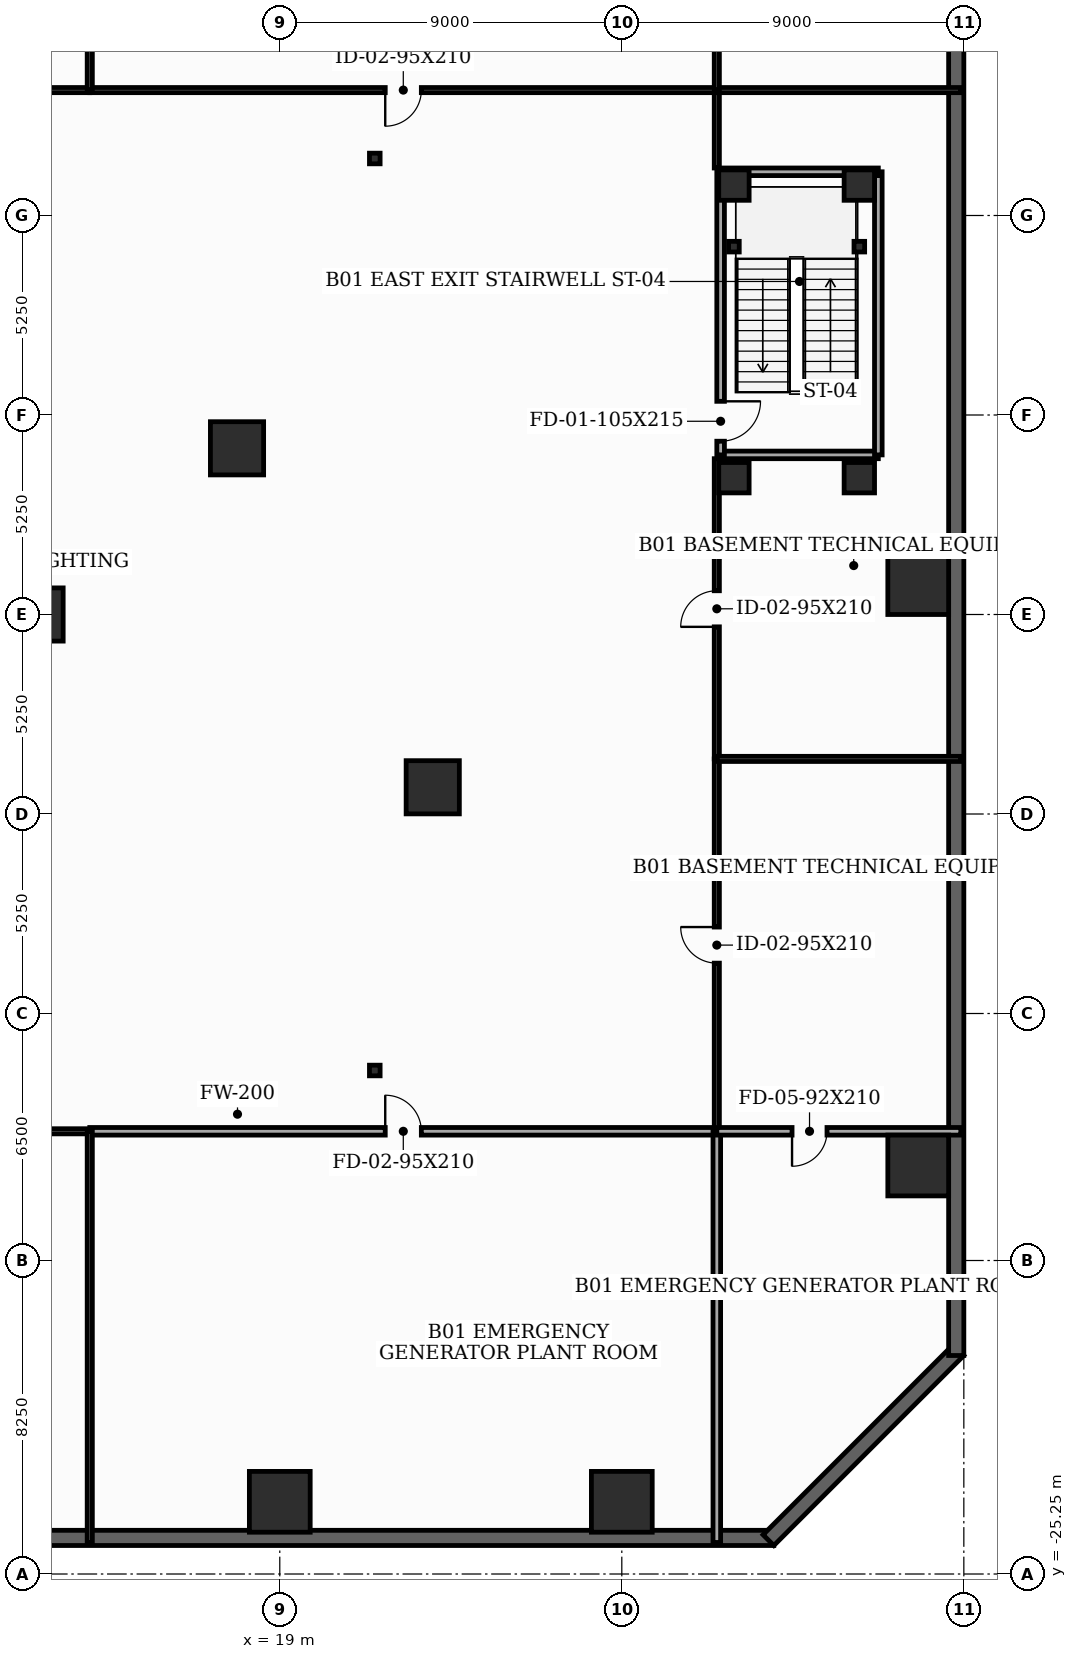
"""IFC4 building model, lengths in metres.
Left out: names, types, materials, properties, quantities, classifications, styles, units other than length and angle.
Written with IfcOpenShell. Run it as: python <this file> out.ifc"""

import sys

from ifc_helpers import new_model, si_unit, direction, frame, frame_2d, origin, origin_2d, place, context, subcontext, project, spatial, rectangle, i_section, extrude, element, fill, save


model = new_model("IFC4")
c1 = context("Model", 3, precision=1e-05, world=origin(), true_north=direction((0.0, 1.0)))
c2 = subcontext(c1, "Body", "Model", "MODEL_VIEW")
j1 = project(units=[si_unit("LENGTHUNIT", "METRE"), si_unit("PLANEANGLEUNIT", "RADIAN")], contexts=[c1])
p1 = place(None, origin())
s1 = spatial("IfcSite", under=j1, at=p1, CompositionType="ELEMENT")
p2 = place(p1, origin())
s2 = spatial("IfcBuilding", under=s1, at=p2, CompositionType="ELEMENT")
p3 = place(p2, frame((0.0, 0.0, -4.8)))
s3 = spatial("IfcBuildingStorey", under=s2, at=p3, CompositionType="ELEMENT", Elevation=-4.8)
p4 = place(p3, frame((12.6, 0.0, 0.0), z_axis=(0.0, 0.0, 1.0), x_axis=(1.0, 0.0, 0.0)))
e1 = element("IfcColumn", 1, at=p4, inside=s3, PredefinedType="COLUMN", context=c2, shape_type="SweptSolid", body=[
    extrude(rectangle(XDim=1.4, YDim=1.4, at=origin_2d()), origin(), (0.0, 0.0, 1.0), 4.8),
])
for number, where, z_axis, x_axis in (
    (2, (19.0, -23.35, 0.0), (0.0, 0.0, 1.0), (1.0, 0.0, 0.0)),
    (3, (28.0, -23.35, 0.0), (0.0, 0.0, 1.0), (1.0, 0.0, 0.0)),
    (4, (35.8, -14.5, 0.0), (0.0, 0.0, 1.0), (1.0, 0.0, 0.0)),
    (5, (35.8, 0.8, 0.0), (0.0, 0.0, 1.0), (1.0, 0.0, 0.0)),
):
    element("IfcColumn", number, at=place(p3, frame(where, z_axis=z_axis, x_axis=x_axis)), inside=s3, PredefinedType="COLUMN", context=c2, shape_type="SweptSolid", body=[
        extrude(rectangle(XDim=1.6, YDim=1.6, at=origin_2d()), origin(), (0.0, 0.0, 1.0), 4.8),
    ])
for number, where, z_axis, x_axis in (
    (6, (23.025, -4.547, 0.0), (0.0, 0.0, 1.0), (1.0, 0.0, 0.0)),
    (7, (17.875, 4.373, 0.0), (0.0, 0.0, 1.0), (1.0, 0.0, 0.0)),
):
    element("IfcColumn", number, at=place(p3, frame(where, z_axis=z_axis, x_axis=x_axis)), inside=s3, PredefinedType="COLUMN", context=c2, shape_type="SweptSolid", body=[
        extrude(rectangle(XDim=1.4, YDim=1.4, at=origin_2d()), origin(), (0.0, 0.0, 1.0), 4.8),
    ])
for number, where, z_axis, x_axis in (
    (8, (21.5, -12.0, 0.0), (0.0, 0.0, 1.0), (1.0, 0.0, 0.0)),
    (9, (21.5, 12.0, 0.0), (0.0, 0.0, 1.0), (1.0, 0.0, 0.0)),
):
    element("IfcColumn", number, at=place(p3, frame(where, z_axis=z_axis, x_axis=x_axis)), inside=s3, PredefinedType="PILASTER", context=c2, shape_type="SweptSolid", body=[
        extrude(i_section(OverallWidth=0.28, OverallDepth=0.28, WebThickness=0.01, FlangeThickness=0.018, at=origin_2d()), origin(), (0.0, 0.0, 1.0), 4.8),
    ])
for number, where, z_axis, x_axis in (
    (10, (30.95, 3.6, 0.0), (0.0, 0.0, 1.0), (1.0, 0.0, 0.0)),
    (11, (34.25, 3.6, 0.0), (0.0, 0.0, 1.0), (1.0, 0.0, 0.0)),
    (12, (34.25, 11.3, 0.0), (0.0, 0.0, 1.0), (1.0, 0.0, 0.0)),
    (13, (30.95, 11.3, 0.0), (0.0, 0.0, 1.0), (1.0, 0.0, 0.0)),
):
    element("IfcColumn", number, at=place(p3, frame(where, z_axis=z_axis, x_axis=x_axis)), inside=s3, PredefinedType="COLUMN", context=c2, shape_type="SweptSolid", body=[
        extrude(rectangle(XDim=0.8, YDim=0.8, at=origin_2d()), origin(), (0.0, 0.0, 1.0), 4.8),
    ])
for number, where, z_axis, x_axis in (
    (14, (30.95, 9.68, 0.0), (0.0, 0.0, 1.0), (1.0, 0.0, 0.0)),
    (15, (34.25, 9.68, 0.0), (0.0, 0.0, 1.0), (1.0, 0.0, 0.0)),
):
    element("IfcColumn", number, at=place(p3, frame(where, z_axis=z_axis, x_axis=x_axis)), inside=s3, PredefinedType="PILASTER", context=c2, shape_type="SweptSolid", body=[
        extrude(i_section(OverallWidth=0.28, OverallDepth=0.28, WebThickness=0.01, FlangeThickness=0.018, at=origin_2d()), origin(), (0.0, 0.0, 1.0), 4.8),
    ])
p5 = place(p3, frame((-32.0, -24.3, 0.0), z_axis=(0.0, 0.0, 1.0), x_axis=(1.0, 0.0, 0.0)))
e16 = element("IfcWall", 16, at=p5, inside=s3, PredefinedType="USERDEFINED", context=c2, shape_type="SweptSolid", body=[
    extrude(rectangle(XDim=64.0, YDim=0.4, at=frame_2d((32.0, 0.0))), origin(), (0.0, 0.0, 1.0), 4.55),
])
p6 = place(p3, frame((31.859, -24.359, 0.0), z_axis=(0.0, 0.0, 1.0), x_axis=(0.707106781187, 0.707106781187, 0.0)))
e17 = element("IfcWall", 17, at=p6, inside=s3, PredefinedType="USERDEFINED", context=c2, shape_type="SweptSolid", body=[
    extrude(rectangle(XDim=7.071, YDim=0.4, at=frame_2d((3.536, 0.0))), origin(), (0.0, 0.0, 1.0), 4.55),
])
p7 = place(p3, frame((36.8, -19.5, 0.0), z_axis=(0.0, 0.0, 1.0), x_axis=(0.0, 1.0, 0.0)))
e18 = element("IfcWall", 18, at=p7, inside=s3, PredefinedType="USERDEFINED", context=c2, shape_type="SweptSolid", body=[
    extrude(rectangle(XDim=48.0, YDim=0.4, at=frame_2d((24.0, 0.0))), origin(), (0.0, 0.0, 1.0), 4.55),
])
p8 = place(p3, frame((30.6, 4.2, 0.0), z_axis=(0.0, 0.0, 1.0), x_axis=(1.0, 0.0, 0.0)))
e19 = element("IfcWall", 19, at=p8, inside=s3, PredefinedType="SOLIDWALL", context=c2, shape_type="SweptSolid", body=[
    extrude(rectangle(XDim=4.15, YDim=0.2, at=frame_2d((2.075, 0.0))), origin(), (0.0, 0.0, 1.0), 3.935),
])
p9 = place(p3, frame((34.75, 4.2, 0.0), z_axis=(0.0, 0.0, 1.0), x_axis=(0.0, 1.0, 0.0)))
e20 = element("IfcWall", 20, at=p9, inside=s3, PredefinedType="SOLIDWALL", context=c2, shape_type="SweptSolid", body=[
    extrude(rectangle(XDim=7.45, YDim=0.2, at=frame_2d((3.725, 0.0))), origin(), (0.0, 0.0, 1.0), 4.55),
])
p10 = place(p3, frame((34.75, 11.65, 0.0), z_axis=(0.0, 0.0, 1.0), x_axis=(-1.0, 0.0, 0.0)))
e21 = element("IfcWall", 21, at=p10, inside=s3, PredefinedType="SOLIDWALL", context=c2, shape_type="SweptSolid", body=[
    extrude(rectangle(XDim=4.15, YDim=0.2, at=frame_2d((2.075, 0.0))), origin(), (0.0, 0.0, 1.0), 4.55),
])
p11 = place(p3, frame((30.6, 11.65, 0.0), z_axis=(0.0, 0.0, 1.0), x_axis=(0.0, -1.0, 0.0)))
e22 = element("IfcWall", 22, at=p11, inside=s3, PredefinedType="SOLIDWALL", context=c2, shape_type="SweptSolid", body=[
    extrude(rectangle(XDim=7.45, YDim=0.2, at=frame_2d((3.725, 0.0))), origin(), (0.0, 0.0, 1.0), 3.935),
])
p12 = place(p11, frame((6.04, 0.0, 0.0)))
e23 = element("IfcOpeningElement", 23, at=p12, cuts=e22, PredefinedType="OPENING", context=c2, shape_type="SweptSolid", body=[
    extrude(rectangle(XDim=1.05, YDim=2.15, at=frame_2d((0.525, 1.075))), frame((0.0, 0.11, 0.0), z_axis=(0.0, -1.0, 0.0), x_axis=(1.0, 0.0, 0.0)), (0.0, 0.0, 1.0), 0.22),
])
p13 = place(p3, frame((-14.0, -13.6, 0.0), z_axis=(0.0, 0.0, 1.0), x_axis=(1.0, 0.0, 0.0)))
e24 = element("IfcWall", 24, at=p13, inside=s3, PredefinedType="PARTITIONING", context=c2, shape_type="SweptSolid", body=[
    extrude(rectangle(XDim=28.0, YDim=0.135, at=frame_2d((14.0, 0.0))), origin(), (0.0, 0.0, 1.0), 3.335),
])
p14 = place(p13, frame((10.165, 0.0, 0.0)))
e25 = element("IfcOpeningElement", 25, at=p14, cuts=e24, PredefinedType="OPENING", context=c2, shape_type="SweptSolid", body=[
    extrude(rectangle(XDim=0.95, YDim=2.1, at=frame_2d((0.475, 1.05))), frame((0.0, 0.077, 0.0), z_axis=(0.0, -1.0, 0.0), x_axis=(1.0, 0.0, 0.0)), (0.0, 0.0, 1.0), 0.155),
])
p15 = place(p3, frame((14.0, -13.6, 0.0), z_axis=(0.0, 0.0, 1.0), x_axis=(1.0, 0.0, 0.0)))
e26 = element("IfcWall", 26, at=p15, inside=s3, PredefinedType="SOLIDWALL", context=c2, shape_type="SweptSolid", body=[
    extrude(rectangle(XDim=16.5, YDim=0.2, at=frame_2d((8.25, 0.0))), origin(), (0.0, 0.0, 1.0), 3.335),
])
p16 = place(p15, frame((7.775, 0.0, 0.0)))
e27 = element("IfcOpeningElement", 27, at=p16, cuts=e26, PredefinedType="OPENING", context=c2, shape_type="SweptSolid", body=[
    extrude(rectangle(XDim=0.95, YDim=2.1, at=frame_2d((0.475, 1.05))), frame((0.0, 0.11, 0.0), z_axis=(0.0, -1.0, 0.0), x_axis=(1.0, 0.0, 0.0)), (0.0, 0.0, 1.0), 0.22),
])
p17 = place(p3, frame((30.5, -13.6, 0.0), z_axis=(0.0, 0.0, 1.0), x_axis=(0.0, 1.0, 0.0)))
e28 = element("IfcWall", 28, at=p17, inside=s3, PredefinedType="PARTITIONING", context=c2, shape_type="SweptSolid", body=[
    extrude(rectangle(XDim=9.8, YDim=0.135, at=frame_2d((4.9, 0.0))), origin(), (0.0, 0.0, 1.0), 3.335),
])
p18 = place(p17, frame((4.425, 0.0, 0.0)))
e29 = element("IfcOpeningElement", 29, at=p18, cuts=e28, PredefinedType="OPENING", context=c2, shape_type="SweptSolid", body=[
    extrude(rectangle(XDim=0.95, YDim=2.1, at=frame_2d((0.475, 1.05))), frame((0.0, 0.077, 0.0), z_axis=(0.0, -1.0, 0.0), x_axis=(1.0, 0.0, 0.0)), (0.0, 0.0, 1.0), 0.155),
])
p19 = place(p3, frame((30.5, -3.8, 0.0), z_axis=(0.0, 0.0, 1.0), x_axis=(0.0, 1.0, 0.0)))
e30 = element("IfcWall", 30, at=p19, inside=s3, PredefinedType="PARTITIONING", context=c2, shape_type="SweptSolid", body=[
    extrude(rectangle(XDim=7.9, YDim=0.135, at=frame_2d((3.95, 0.0))), origin(), (0.0, 0.0, 1.0), 3.335),
])
p20 = place(p19, frame((3.475, 0.0, 0.0)))
e31 = element("IfcOpeningElement", 31, at=p20, cuts=e30, PredefinedType="OPENING", context=c2, shape_type="SweptSolid", body=[
    extrude(rectangle(XDim=0.95, YDim=2.1, at=frame_2d((0.475, 1.05))), frame((0.0, 0.077, 0.0), z_axis=(0.0, -1.0, 0.0), x_axis=(1.0, 0.0, 0.0)), (0.0, 0.0, 1.0), 0.155),
])
p21 = place(p3, frame((30.5, 11.75, 0.0), z_axis=(0.0, 0.0, 1.0), x_axis=(0.0, 1.0, 0.0)))
e32 = element("IfcWall", 32, at=p21, inside=s3, PredefinedType="PARTITIONING", context=c2, shape_type="SweptSolid", body=[
    extrude(rectangle(XDim=2.05, YDim=0.135, at=frame_2d((1.025, 0.0))), origin(), (0.0, 0.0, 1.0), 4.55),
])
p22 = place(p3, frame((30.5, 13.8, 0.0), z_axis=(0.0, 0.0, 1.0), x_axis=(-1.0, 0.0, 0.0)))
e33 = element("IfcWall", 33, at=p22, inside=s3, PredefinedType="PARTITIONING", context=c2, shape_type="SweptSolid", body=[
    extrude(rectangle(XDim=16.5, YDim=0.135, at=frame_2d((8.25, 0.0))), origin(), (0.0, 0.0, 1.0), 3.835),
])
p23 = place(p22, frame((7.775, 0.0, 0.0)))
e34 = element("IfcOpeningElement", 34, at=p23, cuts=e33, PredefinedType="OPENING", context=c2, shape_type="SweptSolid", body=[
    extrude(rectangle(XDim=0.95, YDim=2.1, at=frame_2d((0.475, 1.05))), frame((0.0, 0.077, 0.0), z_axis=(0.0, -1.0, 0.0), x_axis=(1.0, 0.0, 0.0)), (0.0, 0.0, 1.0), 0.155),
])
p24 = place(p3, frame((14.0, 13.8, 0.0), z_axis=(0.0, 0.0, 1.0), x_axis=(-1.0, 0.0, 0.0)))
e35 = element("IfcWall", 35, at=p24, inside=s3, PredefinedType="PARTITIONING", context=c2, shape_type="SweptSolid", body=[
    extrude(rectangle(XDim=24.5, YDim=0.135, at=frame_2d((12.25, 0.0))), origin(), (0.0, 0.0, 1.0), 3.335),
])
p25 = place(p24, frame((8.835, 0.0, 0.0)))
e36 = element("IfcOpeningElement", 36, at=p25, cuts=e35, PredefinedType="OPENING", context=c2, shape_type="SweptSolid", body=[
    extrude(rectangle(XDim=0.95, YDim=2.1, at=frame_2d((0.475, 1.05))), frame((0.0, 0.077, 0.0), z_axis=(0.0, -1.0, 0.0), x_axis=(1.0, 0.0, 0.0)), (0.0, 0.0, 1.0), 0.155),
])
p26 = place(p3, frame((14.0, -24.42, 0.0), z_axis=(0.0, 0.0, 1.0), x_axis=(0.0, 1.0, 0.0)))
e37 = element("IfcWall", 37, at=p26, inside=s3, PredefinedType="PARTITIONING", context=c2, shape_type="SweptSolid", body=[
    extrude(rectangle(XDim=10.82, YDim=0.135, at=frame_2d((5.41, 0.0))), origin(), (0.0, 0.0, 1.0), 3.335),
])
p27 = place(p3, frame((30.5, -24.42, 0.0), z_axis=(0.0, 0.0, 1.0), x_axis=(0.0, 1.0, 0.0)))
e38 = element("IfcWall", 38, at=p27, inside=s3, PredefinedType="SOLIDWALL", context=c2, shape_type="SweptSolid", body=[
    extrude(rectangle(XDim=10.82, YDim=0.2, at=frame_2d((5.41, 0.0))), origin(), (0.0, 0.0, 1.0), 3.835),
])
p28 = place(p3, frame((36.92, -13.6, 0.0), z_axis=(0.0, 0.0, 1.0), x_axis=(-1.0, 0.0, 0.0)))
e39 = element("IfcWall", 39, at=p28, inside=s3, PredefinedType="SOLIDWALL", context=c2, shape_type="SweptSolid", body=[
    extrude(rectangle(XDim=6.42, YDim=0.2, at=frame_2d((3.21, 0.0))), origin(), (0.0, 0.0, 1.0), 3.335),
])
p29 = place(p28, frame((3.521, 0.0, 0.0)))
e40 = element("IfcOpeningElement", 40, at=p29, cuts=e39, PredefinedType="OPENING", context=c2, shape_type="SweptSolid", body=[
    extrude(rectangle(XDim=0.92, YDim=2.1, at=frame_2d((0.46, 1.05))), frame((0.0, 0.11, 0.0), z_axis=(0.0, -1.0, 0.0), x_axis=(1.0, 0.0, 0.0)), (0.0, 0.0, 1.0), 0.22),
])
for number, where, z_axis, x_axis in (
    (41, (36.92, -3.8, 0.0), (0.0, 0.0, 1.0), (-1.0, 0.0, 0.0)),
    (42, (36.92, 13.8, 0.0), (0.0, 0.0, 1.0), (-1.0, 0.0, 0.0)),
):
    element("IfcWall", number, at=place(p3, frame(where, z_axis=z_axis, x_axis=x_axis)), inside=s3, PredefinedType="PARTITIONING", context=c2, shape_type="SweptSolid", body=[
        extrude(rectangle(XDim=6.42, YDim=0.135, at=frame_2d((3.21, 0.0))), origin(), (0.0, 0.0, 1.0), 3.835),
    ])
p30 = place(p3, frame((30.5, 24.1, 0.0), z_axis=(0.0, 0.0, 1.0), x_axis=(0.0, -1.0, 0.0)))
e43 = element("IfcWall", 43, at=p30, inside=s3, PredefinedType="PARTITIONING", context=c2, shape_type="SweptSolid", body=[
    extrude(rectangle(XDim=10.3, YDim=0.135, at=frame_2d((5.15, 0.0))), origin(), (0.0, 0.0, 1.0), 3.335),
])
p31 = place(p30, frame((4.69, 0.0, 0.0)))
e44 = element("IfcOpeningElement", 44, at=p31, cuts=e43, PredefinedType="OPENING", context=c2, shape_type="SweptSolid", body=[
    extrude(rectangle(XDim=0.92, YDim=2.1, at=frame_2d((0.46, 1.05))), frame((0.0, 0.077, 0.0), z_axis=(0.0, -1.0, 0.0), x_axis=(1.0, 0.0, 0.0)), (0.0, 0.0, 1.0), 0.155),
])
p32 = place(p3, frame((14.0, 24.1, 0.0), z_axis=(0.0, 0.0, 1.0), x_axis=(0.0, -1.0, 0.0)))
e45 = element("IfcWall", 45, at=p32, inside=s3, PredefinedType="PARTITIONING", context=c2, shape_type="SweptSolid", body=[
    extrude(rectangle(XDim=10.3, YDim=0.135, at=frame_2d((5.15, 0.0))), origin(), (0.0, 0.0, 1.0), 3.335),
])
p33 = place(p12, origin())
e46 = element("IfcDoor", 46, at=p33, inside=s3, OperationType="SINGLE_SWING_LEFT", PredefinedType="DOOR", context=c2, shape_type="SweptSolid", body=[
    extrude(rectangle(XDim=1.05, YDim=2.15, at=frame_2d((0.525, 1.075))), frame((0.0, 0.025, 0.0), z_axis=(0.0, -1.0, 0.0), x_axis=(1.0, 0.0, 0.0)), (0.0, 0.0, 1.0), 0.05),
])
fill(e23, e46)
p34 = place(p16, origin())
e47 = element("IfcDoor", 47, at=p34, inside=s3, OperationType="SINGLE_SWING_LEFT", PredefinedType="DOOR", context=c2, shape_type="SweptSolid", body=[
    extrude(rectangle(XDim=0.95, YDim=2.1, at=frame_2d((0.475, 1.05))), frame((0.0, 0.025, 0.0), z_axis=(0.0, -1.0, 0.0), x_axis=(1.0, 0.0, 0.0)), (0.0, 0.0, 1.0), 0.05),
])
fill(e27, e47)
p35 = place(p18, origin())
e48 = element("IfcDoor", 48, at=p35, inside=s3, OperationType="SINGLE_SWING_RIGHT", PredefinedType="DOOR", context=c2, shape_type="SweptSolid", body=[
    extrude(rectangle(XDim=0.95, YDim=2.1, at=frame_2d((0.475, 1.05))), frame((0.0, 0.025, 0.0), z_axis=(0.0, -1.0, 0.0), x_axis=(1.0, 0.0, 0.0)), (0.0, 0.0, 1.0), 0.05),
])
fill(e29, e48)
p36 = place(p20, origin())
e49 = element("IfcDoor", 49, at=p36, inside=s3, OperationType="SINGLE_SWING_LEFT", PredefinedType="DOOR", context=c2, shape_type="SweptSolid", body=[
    extrude(rectangle(XDim=0.95, YDim=2.1, at=frame_2d((0.475, 1.05))), frame((0.0, 0.025, 0.0), z_axis=(0.0, -1.0, 0.0), x_axis=(1.0, 0.0, 0.0)), (0.0, 0.0, 1.0), 0.05),
])
fill(e31, e49)
p37 = place(p23, origin())
e50 = element("IfcDoor", 50, at=p37, inside=s3, OperationType="SINGLE_SWING_RIGHT", PredefinedType="DOOR", context=c2, shape_type="SweptSolid", body=[
    extrude(rectangle(XDim=0.95, YDim=2.1, at=frame_2d((0.475, 1.05))), frame((0.0, 0.025, 0.0), z_axis=(0.0, -1.0, 0.0), x_axis=(1.0, 0.0, 0.0)), (0.0, 0.0, 1.0), 0.05),
])
fill(e34, e50)
p38 = place(p29, origin())
e51 = element("IfcDoor", 51, at=p38, inside=s3, OperationType="SINGLE_SWING_RIGHT", PredefinedType="DOOR", context=c2, shape_type="SweptSolid", body=[
    extrude(rectangle(XDim=0.92, YDim=2.1, at=frame_2d((0.46, 1.05))), frame((0.0, 0.025, 0.0), z_axis=(0.0, -1.0, 0.0), x_axis=(1.0, 0.0, 0.0)), (0.0, 0.0, 1.0), 0.05),
])
fill(e40, e51)
save(model, sys.argv[1])
